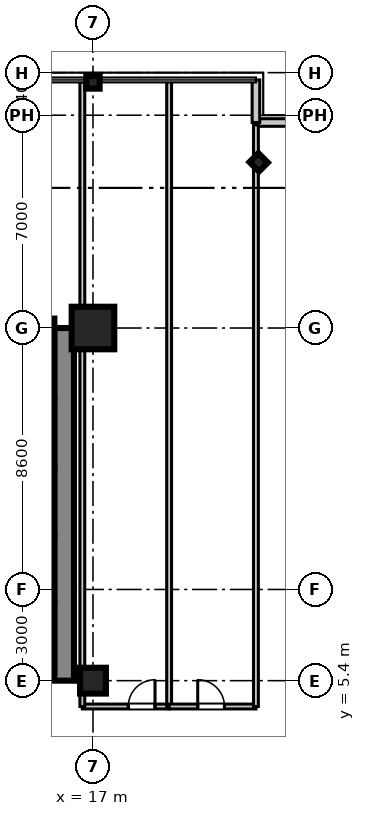
"""IFC4 building model, lengths in metres.
Left out: names, types, materials, properties, quantities, classifications, styles, units other than length and angle.
Written with IfcOpenShell. Run it as: python <this file> out.ifc"""

import sys

from ifc_helpers import new_model, si_unit, direction, frame, frame_2d, origin, origin_2d, place, context, subcontext, project, spatial, rectangle, i_section, extrude, source, transform, mapped, element, fill, save


model = new_model("IFC4")
c1 = context("Model", 3, precision=1e-05, world=origin(), true_north=direction((0.0, 1.0)))
c2 = subcontext(c1, "Body", "Model", "MODEL_VIEW")
j1 = project(units=[si_unit("LENGTHUNIT", "METRE"), si_unit("PLANEANGLEUNIT", "RADIAN")], contexts=[c1])
p1 = place(None, origin())
s1 = spatial("IfcSite", under=j1, at=p1, CompositionType="ELEMENT")
p2 = place(p1, origin())
s2 = spatial("IfcBuilding", under=s1, at=p2, CompositionType="ELEMENT")
p3 = place(p2, frame((0.0, 0.0, 68.9)))
s3 = spatial("IfcBuildingStorey", under=s2, at=p3, CompositionType="ELEMENT", Elevation=68.9)
m1 = source(origin(), c2, "Body", "SweptSolid", [
    extrude(rectangle(XDim=0.85, YDim=0.85, at=origin_2d()), origin(), (0.0, 0.0, 1.0), 3.605),
])
p4 = place(p3, frame((17.0, 5.4, 0.0), z_axis=(0.0, 0.0, 1.0), x_axis=(1.0, 0.0, 0.0)))
e1 = element("IfcColumn", 1, at=p4, inside=s3, PredefinedType="PILASTER", context=c2, shape_type="MappedRepresentation", body=[
    mapped(m1, transform((0.0, 0.0, 0.0), scale=1.0)),
])
m2 = source(origin(), c2, "Body", "SweptSolid", [
    extrude(rectangle(XDim=1.4, YDim=1.4, at=origin_2d()), origin(), (0.0, 0.0, 1.0), 3.605),
])
p5 = place(p3, frame((17.0, 17.0, 0.0), z_axis=(0.0, 0.0, 1.0), x_axis=(1.0, 0.0, 0.0)))
e2 = element("IfcColumn", 2, at=p5, inside=s3, PredefinedType="COLUMN", context=c2, shape_type="MappedRepresentation", body=[
    mapped(m2, transform((0.0, 0.0, 0.0), scale=1.0)),
])
m3 = source(origin(), c2, "Body", "SweptSolid", [
    extrude(i_section(OverallWidth=0.412, OverallDepth=0.438, WebThickness=0.023, FlangeThickness=0.036, at=origin_2d()), origin(), (0.0, 0.0, 1.0), 3.605),
])
for number, where, z_axis, x_axis in (
    (3, (17.0, 25.08, 0.0), (0.0, 0.0, 1.0), (0.0, 1.0, 0.0)),
    (4, (22.45, 22.45, 0.0), (0.0, 0.0, 1.0), (0.707, 0.707, 0.0)),
):
    element("IfcColumn", number, at=place(p3, frame(where, z_axis=z_axis, x_axis=x_axis)), inside=s3, PredefinedType="COLUMN", context=c2, shape_type="MappedRepresentation", body=[
        mapped(m3, transform((0.0, 0.0, 0.0), scale=1.0)),
    ])
m4 = source(origin(), c2, "Body", "SweptSolid", [
    extrude(rectangle(XDim=11.6, YDim=0.65, at=frame_2d((5.8, 0.0))), origin(), (0.0, 0.0, 1.0), 3.37),
])
p6 = place(p3, frame((16.05, 5.4, 0.0), z_axis=(0.0, 0.0, 1.0), x_axis=(0.0, 1.0, 0.0)))
e5 = element("IfcWall", 5, at=p6, inside=s3, PredefinedType="SHEAR", context=c2, shape_type="MappedRepresentation", body=[
    mapped(m4, transform((0.0, 0.0, 0.0), scale=1.0)),
])
m5 = source(origin(), c2, "Body", "SweptSolid", [
    extrude(rectangle(XDim=2.36, YDim=0.22, at=frame_2d((1.18, 0.0))), origin(), (0.0, 0.0, 1.0), 3.37),
])
p7 = place(p3, frame((15.62, 5.64, 0.0), z_axis=(0.0, 0.0, 1.0), x_axis=(0.0, 1.0, 0.0)))
e6 = element("IfcWall", 6, at=p7, inside=s3, PredefinedType="SHEAR", context=c2, shape_type="MappedRepresentation", body=[
    mapped(m5, transform((0.0, 0.0, 0.0), scale=1.0)),
])
m6 = source(origin(), c2, "Body", "SweptSolid", [
    extrude(rectangle(XDim=2.2, YDim=0.22, at=frame_2d((1.1, 0.0))), origin(), (0.0, 0.0, 1.0), 3.37),
])
for number, where, z_axis, x_axis in (
    (7, (15.62, 8.0, 0.0), (0.0, 0.0, 1.0), (0.0, 1.0, 0.0)),
    (8, (15.62, 10.2, 0.0), (0.0, 0.0, 1.0), (0.0, 1.0, 0.0)),
):
    element("IfcWall", number, at=place(p3, frame(where, z_axis=z_axis, x_axis=x_axis)), inside=s3, PredefinedType="SHEAR", context=c2, shape_type="MappedRepresentation", body=[
        mapped(m6, transform((0.0, 0.0, 0.0), scale=1.0)),
    ])
m7 = source(origin(), c2, "Body", "SweptSolid", [
    extrude(rectangle(XDim=2.3, YDim=0.22, at=frame_2d((1.15, 0.0))), origin(), (0.0, 0.0, 1.0), 3.37),
])
p8 = place(p3, frame((15.62, 12.4, 0.0), z_axis=(0.0, 0.0, 1.0), x_axis=(0.0, 1.0, 0.0)))
e9 = element("IfcWall", 9, at=p8, inside=s3, PredefinedType="SHEAR", context=c2, shape_type="MappedRepresentation", body=[
    mapped(m7, transform((0.0, 0.0, 0.0), scale=1.0)),
])
m8 = source(origin(), c2, "Body", "SweptSolid", [
    extrude(rectangle(XDim=2.61, YDim=0.22, at=frame_2d((1.305, 0.0))), origin(), (0.0, 0.0, 1.0), 3.37),
])
p9 = place(p3, frame((15.62, 14.7, 0.0), z_axis=(0.0, 0.0, 1.0), x_axis=(0.0, 1.0, 0.0)))
e10 = element("IfcWall", 10, at=p9, inside=s3, PredefinedType="SHEAR", context=c2, shape_type="MappedRepresentation", body=[
    mapped(m8, transform((0.0, 0.0, 0.0), scale=1.0)),
])
m9 = source(origin(), c2, "Body", "SweptSolid", [
    extrude(rectangle(XDim=1.4, YDim=0.25, at=frame_2d((0.7, 0.0))), origin(), (0.0, 0.0, 1.0), 3.37),
])
for number, where, z_axis, x_axis in (
    (11, (22.36, 23.76, 0.0), (0.0, 0.0, 1.0), (1.0, 0.0, 0.0)),
    (12, (22.36, 23.76, 0.0), (0.0, 0.0, 1.0), (0.0, 1.0, 0.0)),
):
    element("IfcWall", number, at=place(p3, frame(where, z_axis=z_axis, x_axis=x_axis)), inside=s3, PredefinedType="STANDARD", context=c2, shape_type="MappedRepresentation", body=[
        mapped(m9, transform((0.0, 0.0, 0.0), scale=1.0)),
    ])
m10 = source(origin(), c2, "Body", "SweptSolid", [
    extrude(rectangle(XDim=2.855, YDim=0.16, at=frame_2d((1.427, 0.0))), origin(), (0.0, 0.0, 1.0), 2.71),
])
p10 = place(p3, frame((16.65, 4.55, 0.0), z_axis=(0.0, 0.0, 1.0), x_axis=(1.0, 0.0, 0.0)))
e13 = element("IfcWall", 13, at=p10, inside=s3, PredefinedType="PARTITIONING", context=c2, shape_type="MappedRepresentation", body=[
    mapped(m10, transform((0.0, 0.0, 0.0), scale=1.0)),
])
p11 = place(p10, frame((1.511, 0.0, 0.0)))
e14 = element("IfcOpeningElement", 14, at=p11, cuts=e13, PredefinedType="OPENING", context=c2, shape_type="SweptSolid", body=[
    extrude(rectangle(XDim=0.88, YDim=2.1, at=frame_2d((0.44, 1.05))), frame((0.0, 0.09, 0.0), z_axis=(0.0, -1.0, 0.0), x_axis=(1.0, 0.0, 0.0)), (0.0, 0.0, 1.0), 0.18),
])
m11 = source(origin(), c2, "Body", "SweptSolid", [
    extrude(rectangle(XDim=20.55, YDim=0.16, at=frame_2d((10.275, 0.0))), origin(), (0.0, 0.0, 1.0), 2.71),
])
for number, where, z_axis, x_axis in (
    (15, (16.65, 4.55, 0.0), (0.0, 0.0, 1.0), (0.0, 1.0, 0.0)),
    (16, (19.505, 4.55, 0.0), (0.0, 0.0, 1.0), (0.0, 1.0, 0.0)),
):
    element("IfcWall", number, at=place(p3, frame(where, z_axis=z_axis, x_axis=x_axis)), inside=s3, PredefinedType="PARTITIONING", context=c2, shape_type="MappedRepresentation", body=[
        mapped(m11, transform((0.0, 0.0, 0.0), scale=1.0)),
    ])
m12 = source(origin(), c2, "Body", "SweptSolid", [
    extrude(rectangle(XDim=2.855, YDim=0.16, at=frame_2d((1.428, 0.0))), origin(), (0.0, 0.0, 1.0), 2.71),
])
p12 = place(p3, frame((19.505, 4.55, 0.0), z_axis=(0.0, 0.0, 1.0), x_axis=(1.0, 0.0, 0.0)))
e17 = element("IfcWall", 17, at=p12, inside=s3, PredefinedType="PARTITIONING", context=c2, shape_type="MappedRepresentation", body=[
    mapped(m12, transform((0.0, 0.0, 0.0), scale=1.0)),
])
p13 = place(p12, frame((0.94, 0.0, 0.0)))
e18 = element("IfcOpeningElement", 18, at=p13, cuts=e17, PredefinedType="OPENING", context=c2, shape_type="SweptSolid", body=[
    extrude(rectangle(XDim=0.88, YDim=2.1, at=frame_2d((0.44, 1.05))), frame((0.0, 0.09, 0.0), z_axis=(0.0, -1.0, 0.0), x_axis=(1.0, 0.0, 0.0)), (0.0, 0.0, 1.0), 0.18),
])
m13 = source(origin(), c2, "Body", "SweptSolid", [
    extrude(rectangle(XDim=19.13, YDim=0.16, at=frame_2d((9.565, 0.0))), origin(), (0.0, 0.0, 1.0), 2.71),
])
p14 = place(p3, frame((22.36, 4.55, 0.0), z_axis=(0.0, 0.0, 1.0), x_axis=(0.0, 1.0, 0.0)))
e19 = element("IfcWall", 19, at=p14, inside=s3, PredefinedType="PARTITIONING", context=c2, shape_type="MappedRepresentation", body=[
    mapped(m13, transform((0.0, 0.0, 0.0), scale=1.0)),
])
m14 = source(origin(), c2, "Body", "SweptSolid", [
    extrude(rectangle(XDim=0.88, YDim=2.1, at=frame_2d((0.44, 1.05))), frame((0.0, 0.025, 0.0), z_axis=(0.0, -1.0, 0.0), x_axis=(1.0, 0.0, 0.0)), (0.0, 0.0, 1.0), 0.05),
])
p15 = place(p11, origin())
e20 = element("IfcDoor", 20, at=p15, inside=s3, OperationType="SINGLE_SWING_RIGHT", PredefinedType="DOOR", context=c2, shape_type="MappedRepresentation", body=[
    mapped(m14, transform((0.0, 0.0, 0.0), scale=1.0)),
])
fill(e14, e20)
p16 = place(p13, origin())
e21 = element("IfcDoor", 21, at=p16, inside=s3, OperationType="SINGLE_SWING_LEFT", PredefinedType="DOOR", context=c2, shape_type="MappedRepresentation", body=[
    mapped(m14, transform((0.0, 0.0, 0.0), scale=1.0)),
])
fill(e18, e21)
save(model, sys.argv[1])
